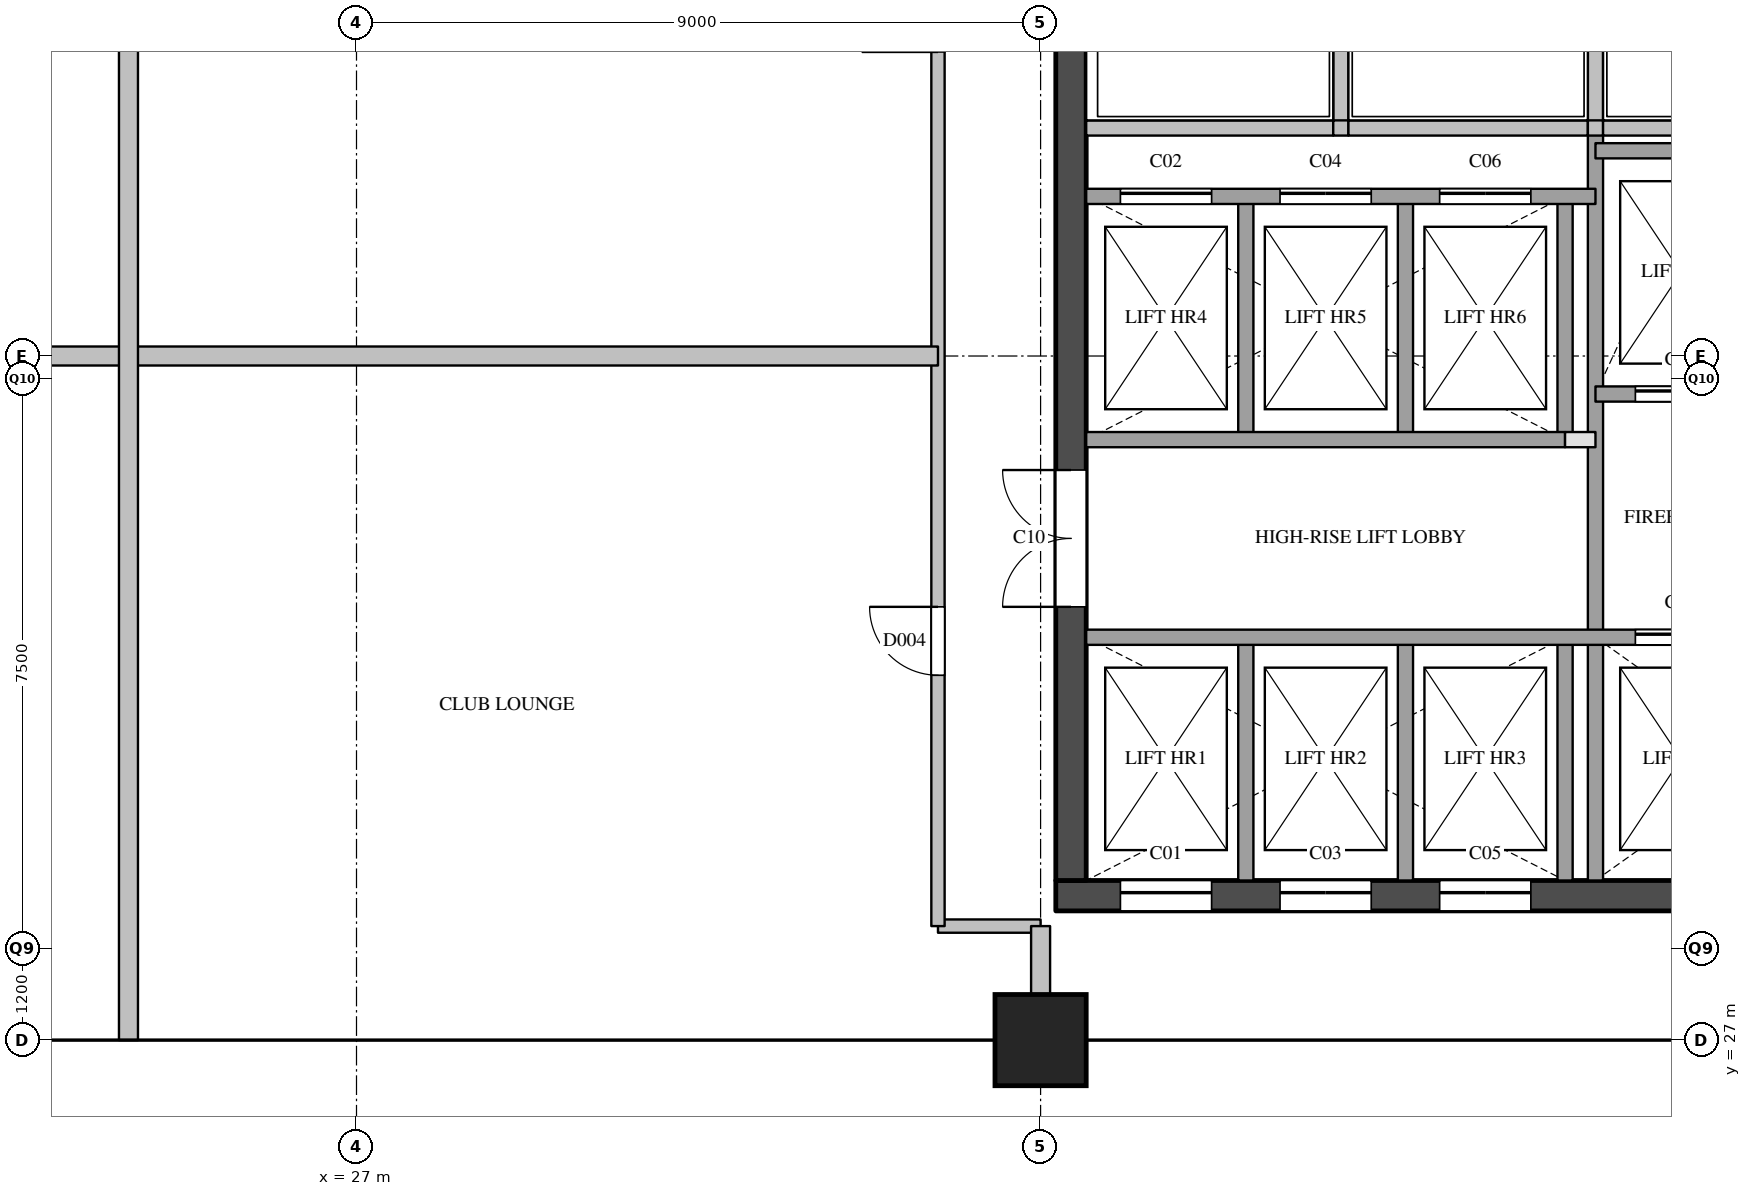
"""IFC4 building model, lengths in metres.
Left out: names, types, materials, properties, quantities, classifications, styles, units other than length and angle.
Written with IfcOpenShell. Run it as: python <this file> out.ifc"""

import sys

from ifc_helpers import new_model, si_unit, direction, frame, frame_2d, origin, origin_2d, place, context, subcontext, project, spatial, rectangle, extrude, element, fill, save


model = new_model("IFC4")
c1 = context("Model", 3, precision=1e-05, world=origin(), true_north=direction((0.0, 1.0)))
c2 = subcontext(c1, "Body", "Model", "MODEL_VIEW")
j1 = project(units=[si_unit("LENGTHUNIT", "METRE"), si_unit("PLANEANGLEUNIT", "RADIAN")], contexts=[c1])
p1 = place(None, origin())
s1 = spatial("IfcSite", under=j1, at=p1, CompositionType="ELEMENT")
p2 = place(p1, origin())
s2 = spatial("IfcBuilding", under=s1, at=p2, CompositionType="ELEMENT")
p3 = place(p2, frame((0.0, 0.0, 226.7)))
s3 = spatial("IfcBuildingStorey", under=s2, at=p3, CompositionType="ELEMENT", Elevation=226.7)
p4 = place(p3, frame((36.0, 27.0, 0.0), z_axis=(0.0, 0.0, 1.0), x_axis=(1.0, 0.0, 0.0)))
e1 = element("IfcColumn", 1, at=p4, inside=s3, PredefinedType="COLUMN", context=c2, shape_type="SweptSolid", body=[
    extrude(rectangle(XDim=1.2, YDim=1.2, at=origin_2d()), origin(), (0.0, 0.0, 1.0), 3.9),
])
p5 = place(p3, frame((36.2, 28.9, 0.0), z_axis=(0.0, 0.0, 1.0), x_axis=(1.0, 0.0, 0.0)))
e2 = element("IfcWall", 2, at=p5, inside=s3, PredefinedType="SHEAR", context=c2, shape_type="SweptSolid", body=[
    extrude(rectangle(XDim=12.0, YDim=0.4, at=frame_2d((6.0, 0.0))), origin(), (0.0, 0.0, 1.0), 3.5),
])
p6 = place(p5, frame((0.85, 0.0, 0.0)))
e3 = element("IfcOpeningElement", 3, at=p6, cuts=e2, PredefinedType="OPENING", context=c2, shape_type="SweptSolid", body=[
    extrude(rectangle(XDim=1.2, YDim=2.1, at=frame_2d((0.6, 1.05))), frame((0.0, 0.21, 0.0), z_axis=(0.0, -1.0, 0.0), x_axis=(1.0, 0.0, 0.0)), (0.0, 0.0, 1.0), 0.42),
])
p7 = place(p5, frame((2.95, 0.0, 0.0)))
e4 = element("IfcOpeningElement", 4, at=p7, cuts=e2, PredefinedType="OPENING", context=c2, shape_type="SweptSolid", body=[
    extrude(rectangle(XDim=1.2, YDim=2.1, at=frame_2d((0.6, 1.05))), frame((0.0, 0.21, 0.0), z_axis=(0.0, -1.0, 0.0), x_axis=(1.0, 0.0, 0.0)), (0.0, 0.0, 1.0), 0.42),
])
p8 = place(p5, frame((5.05, 0.0, 0.0)))
e5 = element("IfcOpeningElement", 5, at=p8, cuts=e2, PredefinedType="OPENING", context=c2, shape_type="SweptSolid", body=[
    extrude(rectangle(XDim=1.2, YDim=2.1, at=frame_2d((0.6, 1.05))), frame((0.0, 0.21, 0.0), z_axis=(0.0, -1.0, 0.0), x_axis=(1.0, 0.0, 0.0)), (0.0, 0.0, 1.0), 0.42),
])
p9 = place(p3, frame((36.4, 29.1, 0.0), z_axis=(0.0, 0.0, 1.0), x_axis=(0.0, 1.0, 0.0)))
e6 = element("IfcWall", 6, at=p9, inside=s3, PredefinedType="SHEAR", context=c2, shape_type="SweptSolid", body=[
    extrude(rectangle(XDim=20.3, YDim=0.4, at=frame_2d((10.15, 0.0))), origin(), (0.0, 0.0, 1.0), 3.5),
])
p10 = place(p9, frame((3.6, 0.0, 0.0)))
e7 = element("IfcOpeningElement", 7, at=p10, cuts=e6, PredefinedType="OPENING", context=c2, shape_type="SweptSolid", body=[
    extrude(rectangle(XDim=1.8, YDim=2.1, at=frame_2d((0.9, 1.05))), frame((0.0, 0.21, 0.0), z_axis=(0.0, -1.0, 0.0), x_axis=(1.0, 0.0, 0.0)), (0.0, 0.0, 1.0), 0.42),
])
p11 = place(p3, frame((38.7, 29.1, 0.0), z_axis=(0.0, 0.0, 1.0), x_axis=(0.0, 1.0, 0.0)))
e8 = element("IfcWall", 8, at=p11, inside=s3, PredefinedType="SOLIDWALL", context=c2, shape_type="SweptSolid", body=[
    extrude(rectangle(XDim=3.2, YDim=0.2, at=frame_2d((1.6, 0.0))), origin(), (0.0, 0.0, 1.0), 3.5),
])
p12 = place(p3, frame((38.7, 34.9, 0.0), z_axis=(0.0, 0.0, 1.0), x_axis=(0.0, 1.0, 0.0)))
e9 = element("IfcWall", 9, at=p12, inside=s3, PredefinedType="SOLIDWALL", context=c2, shape_type="SweptSolid", body=[
    extrude(rectangle(XDim=3.2, YDim=0.2, at=frame_2d((1.6, 0.0))), origin(), (0.0, 0.0, 1.0), 3.5),
])
p13 = place(p3, frame((39.95, 39.0, 0.0), z_axis=(0.0, 0.0, 1.0), x_axis=(0.0, 1.0, 0.0)))
e10 = element("IfcWall", 10, at=p13, inside=s3, PredefinedType="SOLIDWALL", context=c2, shape_type="SweptSolid", body=[
    extrude(rectangle(XDim=1.78, YDim=0.2, at=frame_2d((0.89, 0.0))), origin(), (0.0, 0.0, 1.0), 3.5),
])
p14 = place(p3, frame((40.8, 29.1, 0.0), z_axis=(0.0, 0.0, 1.0), x_axis=(0.0, 1.0, 0.0)))
e11 = element("IfcWall", 11, at=p14, inside=s3, PredefinedType="SOLIDWALL", context=c2, shape_type="SweptSolid", body=[
    extrude(rectangle(XDim=3.2, YDim=0.2, at=frame_2d((1.6, 0.0))), origin(), (0.0, 0.0, 1.0), 3.5),
])
p15 = place(p3, frame((40.8, 34.9, 0.0), z_axis=(0.0, 0.0, 1.0), x_axis=(0.0, 1.0, 0.0)))
e12 = element("IfcWall", 12, at=p15, inside=s3, PredefinedType="SOLIDWALL", context=c2, shape_type="SweptSolid", body=[
    extrude(rectangle(XDim=3.2, YDim=0.2, at=frame_2d((1.6, 0.0))), origin(), (0.0, 0.0, 1.0), 3.5),
])
p16 = place(p3, frame((42.9, 29.1, 0.0), z_axis=(0.0, 0.0, 1.0), x_axis=(0.0, 1.0, 0.0)))
e13 = element("IfcWall", 13, at=p16, inside=s3, PredefinedType="SOLIDWALL", context=c2, shape_type="SweptSolid", body=[
    extrude(rectangle(XDim=3.2, YDim=0.2, at=frame_2d((1.6, 0.0))), origin(), (0.0, 0.0, 1.0), 3.5),
])
p17 = place(p3, frame((42.9, 34.9, 0.0), z_axis=(0.0, 0.0, 1.0), x_axis=(0.0, 1.0, 0.0)))
e14 = element("IfcWall", 14, at=p17, inside=s3, PredefinedType="SOLIDWALL", context=c2, shape_type="SweptSolid", body=[
    extrude(rectangle(XDim=3.2, YDim=0.2, at=frame_2d((1.6, 0.0))), origin(), (0.0, 0.0, 1.0), 3.5),
])
p18 = place(p3, frame((43.3, 29.1, 0.0), z_axis=(0.0, 0.0, 1.0), x_axis=(0.0, 1.0, 0.0)))
e15 = element("IfcWall", 15, at=p18, inside=s3, PredefinedType="SOLIDWALL", context=c2, shape_type="SweptSolid", body=[
    extrude(rectangle(XDim=9.9, YDim=0.2, at=frame_2d((4.95, 0.0))), origin(), (0.0, 0.0, 1.0), 3.5),
])
p19 = place(p3, frame((43.3, 39.0, 0.0), z_axis=(0.0, 0.0, 1.0), x_axis=(0.0, 1.0, 0.0)))
e16 = element("IfcWall", 16, at=p19, inside=s3, PredefinedType="SOLIDWALL", context=c2, shape_type="SweptSolid", body=[
    extrude(rectangle(XDim=1.78, YDim=0.2, at=frame_2d((0.89, 0.0))), origin(), (0.0, 0.0, 1.0), 3.5),
])
p20 = place(p3, frame((36.6, 32.3, 0.0), z_axis=(0.0, 0.0, 1.0), x_axis=(1.0, 0.0, 0.0)))
e17 = element("IfcWall", 17, at=p20, inside=s3, PredefinedType="SOLIDWALL", context=c2, shape_type="SweptSolid", body=[
    extrude(rectangle(XDim=11.2, YDim=0.2, at=frame_2d((5.6, 0.0))), origin(), (0.0, 0.0, 1.0), 3.5),
])
p21 = place(p20, frame((7.225, 0.0, 0.0)))
e18 = element("IfcOpeningElement", 18, at=p21, cuts=e17, PredefinedType="OPENING", context=c2, shape_type="SweptSolid", body=[
    extrude(rectangle(XDim=1.2, YDim=2.1, at=frame_2d((0.6, 1.05))), frame((0.0, 0.11, 0.0), z_axis=(0.0, -1.0, 0.0), x_axis=(1.0, 0.0, 0.0)), (0.0, 0.0, 1.0), 0.22),
])
p22 = place(p20, frame((9.475, 0.0, 0.0)))
e19 = element("IfcOpeningElement", 19, at=p22, cuts=e17, PredefinedType="OPENING", context=c2, shape_type="SweptSolid", body=[
    extrude(rectangle(XDim=1.2, YDim=2.1, at=frame_2d((0.6, 1.05))), frame((0.0, 0.11, 0.0), z_axis=(0.0, -1.0, 0.0), x_axis=(1.0, 0.0, 0.0)), (0.0, 0.0, 1.0), 0.22),
])
p23 = place(p3, frame((42.9, 34.9, 0.0), z_axis=(0.0, 0.0, 1.0), x_axis=(1.0, 0.0, 0.0)))
e20 = element("IfcWall", 20, at=p23, inside=s3, PredefinedType="PARTITIONING", context=c2, shape_type="SweptSolid", body=[
    extrude(rectangle(XDim=0.4, YDim=0.2, at=frame_2d((0.2, 0.0))), origin(), (0.0, 0.0, 1.0), 3.5),
])
p24 = place(p3, frame((36.6, 34.9, 0.0), z_axis=(0.0, 0.0, 1.0), x_axis=(1.0, 0.0, 0.0)))
e21 = element("IfcWall", 21, at=p24, inside=s3, PredefinedType="SOLIDWALL", context=c2, shape_type="SweptSolid", body=[
    extrude(rectangle(XDim=6.3, YDim=0.2, at=frame_2d((3.15, 0.0))), origin(), (0.0, 0.0, 1.0), 3.5),
])
p25 = place(p3, frame((43.3, 35.5, 0.0), z_axis=(0.0, 0.0, 1.0), x_axis=(1.0, 0.0, 0.0)))
e22 = element("IfcWall", 22, at=p25, inside=s3, PredefinedType="SOLIDWALL", context=c2, shape_type="SweptSolid", body=[
    extrude(rectangle(XDim=4.5, YDim=0.2, at=frame_2d((2.25, 0.0))), origin(), (0.0, 0.0, 1.0), 3.5),
])
p26 = place(p25, frame((0.525, 0.0, 0.0)))
e23 = element("IfcOpeningElement", 23, at=p26, cuts=e22, PredefinedType="OPENING", context=c2, shape_type="SweptSolid", body=[
    extrude(rectangle(XDim=1.2, YDim=2.1, at=frame_2d((0.6, 1.05))), frame((0.0, 0.11, 0.0), z_axis=(0.0, -1.0, 0.0), x_axis=(1.0, 0.0, 0.0)), (0.0, 0.0, 1.0), 0.22),
])
p27 = place(p25, frame((3.025, 0.0, 0.0)))
e24 = element("IfcOpeningElement", 24, at=p27, cuts=e22, PredefinedType="OPENING", context=c2, shape_type="SweptSolid", body=[
    extrude(rectangle(XDim=0.7, YDim=2.1, at=frame_2d((0.35, 1.05))), frame((0.0, 0.11, 0.0), z_axis=(0.0, -1.0, 0.0), x_axis=(1.0, 0.0, 0.0)), (0.0, 0.0, 1.0), 0.22),
])
p28 = place(p3, frame((36.6, 38.1, 0.0), z_axis=(0.0, 0.0, 1.0), x_axis=(1.0, 0.0, 0.0)))
e25 = element("IfcWall", 25, at=p28, inside=s3, PredefinedType="SOLIDWALL", context=c2, shape_type="SweptSolid", body=[
    extrude(rectangle(XDim=6.7, YDim=0.2, at=frame_2d((3.35, 0.0))), origin(), (0.0, 0.0, 1.0), 3.5),
])
p29 = place(p28, frame((0.45, 0.0, 0.0)))
e26 = element("IfcOpeningElement", 26, at=p29, cuts=e25, PredefinedType="OPENING", context=c2, shape_type="SweptSolid", body=[
    extrude(rectangle(XDim=1.2, YDim=2.1, at=frame_2d((0.6, 1.05))), frame((0.0, 0.11, 0.0), z_axis=(0.0, -1.0, 0.0), x_axis=(1.0, 0.0, 0.0)), (0.0, 0.0, 1.0), 0.22),
])
p30 = place(p28, frame((2.55, 0.0, 0.0)))
e27 = element("IfcOpeningElement", 27, at=p30, cuts=e25, PredefinedType="OPENING", context=c2, shape_type="SweptSolid", body=[
    extrude(rectangle(XDim=1.2, YDim=2.1, at=frame_2d((0.6, 1.05))), frame((0.0, 0.11, 0.0), z_axis=(0.0, -1.0, 0.0), x_axis=(1.0, 0.0, 0.0)), (0.0, 0.0, 1.0), 0.22),
])
p31 = place(p28, frame((4.65, 0.0, 0.0)))
e28 = element("IfcOpeningElement", 28, at=p31, cuts=e25, PredefinedType="OPENING", context=c2, shape_type="SweptSolid", body=[
    extrude(rectangle(XDim=1.2, YDim=2.1, at=frame_2d((0.6, 1.05))), frame((0.0, 0.11, 0.0), z_axis=(0.0, -1.0, 0.0), x_axis=(1.0, 0.0, 0.0)), (0.0, 0.0, 1.0), 0.22),
])
p32 = place(p3, frame((43.3, 38.7, 0.0), z_axis=(0.0, 0.0, 1.0), x_axis=(1.0, 0.0, 0.0)))
e29 = element("IfcWall", 29, at=p32, inside=s3, PredefinedType="SOLIDWALL", context=c2, shape_type="SweptSolid", body=[
    extrude(rectangle(XDim=4.5, YDim=0.2, at=frame_2d((2.25, 0.0))), origin(), (0.0, 0.0, 1.0), 3.5),
])
p33 = place(p3, frame((36.6, 39.0, 0.0), z_axis=(0.0, 0.0, 1.0), x_axis=(1.0, 0.0, 0.0)))
e30 = element("IfcWall", 30, at=p33, inside=s3, PredefinedType="SOLIDWALL", context=c2, shape_type="SweptSolid", body=[
    extrude(rectangle(XDim=3.25, YDim=0.2, at=frame_2d((1.625, 0.0))), origin(), (0.0, 0.0, 1.0), 3.5),
])
p34 = place(p3, frame((39.85, 39.0, 0.0), z_axis=(0.0, 0.0, 1.0), x_axis=(1.0, 0.0, 0.0)))
e31 = element("IfcWall", 31, at=p34, inside=s3, PredefinedType="SOLIDWALL", context=c2, shape_type="SweptSolid", body=[
    extrude(rectangle(XDim=0.2, YDim=0.2, at=frame_2d((0.1, 0.0))), origin(), (0.0, 0.0, 1.0), 3.5),
])
p35 = place(p3, frame((40.05, 39.0, 0.0), z_axis=(0.0, 0.0, 1.0), x_axis=(1.0, 0.0, 0.0)))
e32 = element("IfcWall", 32, at=p35, inside=s3, PredefinedType="SOLIDWALL", context=c2, shape_type="SweptSolid", body=[
    extrude(rectangle(XDim=3.15, YDim=0.2, at=frame_2d((1.575, 0.0))), origin(), (0.0, 0.0, 1.0), 3.5),
])
p36 = place(p3, frame((43.2, 39.0, 0.0), z_axis=(0.0, 0.0, 1.0), x_axis=(1.0, 0.0, 0.0)))
e33 = element("IfcWall", 33, at=p36, inside=s3, PredefinedType="SOLIDWALL", context=c2, shape_type="SweptSolid", body=[
    extrude(rectangle(XDim=0.2, YDim=0.2, at=frame_2d((0.1, 0.0))), origin(), (0.0, 0.0, 1.0), 3.5),
])
p37 = place(p3, frame((43.4, 39.0, 0.0), z_axis=(0.0, 0.0, 1.0), x_axis=(1.0, 0.0, 0.0)))
e34 = element("IfcWall", 34, at=p37, inside=s3, PredefinedType="SOLIDWALL", context=c2, shape_type="SweptSolid", body=[
    extrude(rectangle(XDim=3.25, YDim=0.2, at=frame_2d((1.625, 0.0))), origin(), (0.0, 0.0, 1.0), 3.5),
])
p38 = place(p3, frame((34.65, 28.5, 0.0), z_axis=(0.0, 0.0, 1.0), x_axis=(1.0, 0.0, 0.0)))
e35 = element("IfcWall", 35, at=p38, inside=s3, PredefinedType="PARTITIONING", context=c2, shape_type="SweptSolid", body=[
    extrude(rectangle(XDim=1.35, YDim=0.175, at=frame_2d((0.675, 0.0))), origin(), (0.0, 0.0, 1.0), 3.5),
])
p39 = place(p3, frame((34.65, 28.5, 0.0), z_axis=(0.0, 0.0, 1.0), x_axis=(0.0, 1.0, 0.0)))
e36 = element("IfcWall", 36, at=p39, inside=s3, PredefinedType="PARTITIONING", context=c2, shape_type="SweptSolid", body=[
    extrude(rectangle(XDim=22.85, YDim=0.175, at=frame_2d((11.425, 0.0))), origin(), (0.0, 0.0, 1.0), 3.5),
])
p40 = place(p39, frame((3.3, 0.0, 0.0)))
e37 = element("IfcOpeningElement", 37, at=p40, cuts=e36, PredefinedType="OPENING", context=c2, shape_type="SweptSolid", body=[
    extrude(rectangle(XDim=0.9, YDim=2.1, at=frame_2d((0.45, 1.05))), frame((0.0, 0.097, 0.0), z_axis=(0.0, -1.0, 0.0), x_axis=(1.0, 0.0, 0.0)), (0.0, 0.0, 1.0), 0.195),
])
p41 = place(p39, frame((11.5, 0.0, 0.0)))
e38 = element("IfcOpeningElement", 38, at=p41, cuts=e36, PredefinedType="OPENING", context=c2, shape_type="SweptSolid", body=[
    extrude(rectangle(XDim=1.0, YDim=2.1, at=frame_2d((0.5, 1.05))), frame((0.0, 0.097, 0.0), z_axis=(0.0, -1.0, 0.0), x_axis=(1.0, 0.0, 0.0)), (0.0, 0.0, 1.0), 0.195),
])
p42 = place(p39, frame((19.225, 0.0, 0.0)))
e39 = element("IfcOpeningElement", 39, at=p42, cuts=e36, PredefinedType="OPENING", context=c2, shape_type="SweptSolid", body=[
    extrude(rectangle(XDim=0.9, YDim=2.1, at=frame_2d((0.45, 1.05))), frame((0.0, 0.097, 0.0), z_axis=(0.0, -1.0, 0.0), x_axis=(1.0, 0.0, 0.0)), (0.0, 0.0, 1.0), 0.195),
])
p43 = place(p3, frame((19.35, 36.0, 0.0), z_axis=(0.0, 0.0, 1.0), x_axis=(1.0, 0.0, 0.0)))
e40 = element("IfcWall", 40, at=p43, inside=s3, PredefinedType="PARTITIONING", context=c2, shape_type="SweptSolid", body=[
    extrude(rectangle(XDim=15.3, YDim=0.25, at=frame_2d((7.65, 0.0))), origin(), (0.0, 0.0, 1.0), 3.5),
])
p44 = place(p3, frame((24.0, 27.0, 0.0), z_axis=(0.0, 0.0, 1.0), x_axis=(0.0, 1.0, 0.0)))
e41 = element("IfcWall", 41, at=p44, inside=s3, PredefinedType="PARTITIONING", context=c2, shape_type="SweptSolid", body=[
    extrude(rectangle(XDim=27.0, YDim=0.25, at=frame_2d((13.5, 0.0))), origin(), (0.0, 0.0, 1.0), 3.5),
])
p45 = place(p3, frame((36.0, 27.0, 0.0), z_axis=(0.0, 0.0, 1.0), x_axis=(0.0, 1.0, 0.0)))
e42 = element("IfcWall", 42, at=p45, inside=s3, PredefinedType="PARTITIONING", context=c2, shape_type="SweptSolid", body=[
    extrude(rectangle(XDim=1.5, YDim=0.25, at=frame_2d((0.75, 0.0))), origin(), (0.0, 0.0, 1.0), 3.5),
])
p46 = place(p6, origin())
e43 = element("IfcDoor", 43, at=p46, inside=s3, OperationType="SLIDING_TO_LEFT", PredefinedType="DOOR", context=c2, shape_type="SweptSolid", body=[
    extrude(rectangle(XDim=1.2, YDim=2.1, at=frame_2d((0.6, 1.05))), frame((0.0, 0.025, 0.0), z_axis=(0.0, -1.0, 0.0), x_axis=(1.0, 0.0, 0.0)), (0.0, 0.0, 1.0), 0.05),
])
fill(e3, e43)
p47 = place(p29, origin())
e44 = element("IfcDoor", 44, at=p47, inside=s3, OperationType="SLIDING_TO_LEFT", PredefinedType="DOOR", context=c2, shape_type="SweptSolid", body=[
    extrude(rectangle(XDim=1.2, YDim=2.1, at=frame_2d((0.6, 1.05))), frame((0.0, 0.025, 0.0), z_axis=(0.0, -1.0, 0.0), x_axis=(1.0, 0.0, 0.0)), (0.0, 0.0, 1.0), 0.05),
])
fill(e26, e44)
p48 = place(p7, origin())
e45 = element("IfcDoor", 45, at=p48, inside=s3, OperationType="SLIDING_TO_LEFT", PredefinedType="DOOR", context=c2, shape_type="SweptSolid", body=[
    extrude(rectangle(XDim=1.2, YDim=2.1, at=frame_2d((0.6, 1.05))), frame((0.0, 0.025, 0.0), z_axis=(0.0, -1.0, 0.0), x_axis=(1.0, 0.0, 0.0)), (0.0, 0.0, 1.0), 0.05),
])
fill(e4, e45)
p49 = place(p30, origin())
e46 = element("IfcDoor", 46, at=p49, inside=s3, OperationType="SLIDING_TO_LEFT", PredefinedType="DOOR", context=c2, shape_type="SweptSolid", body=[
    extrude(rectangle(XDim=1.2, YDim=2.1, at=frame_2d((0.6, 1.05))), frame((0.0, 0.025, 0.0), z_axis=(0.0, -1.0, 0.0), x_axis=(1.0, 0.0, 0.0)), (0.0, 0.0, 1.0), 0.05),
])
fill(e27, e46)
p50 = place(p8, origin())
e47 = element("IfcDoor", 47, at=p50, inside=s3, OperationType="SLIDING_TO_LEFT", PredefinedType="DOOR", context=c2, shape_type="SweptSolid", body=[
    extrude(rectangle(XDim=1.2, YDim=2.1, at=frame_2d((0.6, 1.05))), frame((0.0, 0.025, 0.0), z_axis=(0.0, -1.0, 0.0), x_axis=(1.0, 0.0, 0.0)), (0.0, 0.0, 1.0), 0.05),
])
fill(e5, e47)
p51 = place(p31, origin())
e48 = element("IfcDoor", 48, at=p51, inside=s3, OperationType="SLIDING_TO_LEFT", PredefinedType="DOOR", context=c2, shape_type="SweptSolid", body=[
    extrude(rectangle(XDim=1.2, YDim=2.1, at=frame_2d((0.6, 1.05))), frame((0.0, 0.025, 0.0), z_axis=(0.0, -1.0, 0.0), x_axis=(1.0, 0.0, 0.0)), (0.0, 0.0, 1.0), 0.05),
])
fill(e28, e48)
p52 = place(p21, origin())
e49 = element("IfcDoor", 49, at=p52, inside=s3, OperationType="SLIDING_TO_LEFT", PredefinedType="DOOR", context=c2, shape_type="SweptSolid", body=[
    extrude(rectangle(XDim=1.2, YDim=2.1, at=frame_2d((0.6, 1.05))), frame((0.0, 0.025, 0.0), z_axis=(0.0, -1.0, 0.0), x_axis=(1.0, 0.0, 0.0)), (0.0, 0.0, 1.0), 0.05),
])
fill(e18, e49)
p53 = place(p26, origin())
e50 = element("IfcDoor", 50, at=p53, inside=s3, OperationType="SLIDING_TO_LEFT", PredefinedType="DOOR", context=c2, shape_type="SweptSolid", body=[
    extrude(rectangle(XDim=1.2, YDim=2.1, at=frame_2d((0.6, 1.05))), frame((0.0, 0.025, 0.0), z_axis=(0.0, -1.0, 0.0), x_axis=(1.0, 0.0, 0.0)), (0.0, 0.0, 1.0), 0.05),
])
fill(e23, e50)
p54 = place(p10, origin())
e51 = element("IfcDoor", 51, at=p54, inside=s3, OperationType="DOUBLE_DOOR_SINGLE_SWING", PredefinedType="DOOR", context=c2, shape_type="SweptSolid", body=[
    extrude(rectangle(XDim=1.8, YDim=2.1, at=frame_2d((0.9, 1.05))), frame((0.0, 0.025, 0.0), z_axis=(0.0, -1.0, 0.0), x_axis=(1.0, 0.0, 0.0)), (0.0, 0.0, 1.0), 0.05),
])
fill(e7, e51)
p55 = place(p40, origin())
e52 = element("IfcDoor", 52, at=p55, inside=s3, OperationType="SINGLE_SWING_RIGHT", PredefinedType="DOOR", context=c2, shape_type="SweptSolid", body=[
    extrude(rectangle(XDim=0.9, YDim=2.1, at=frame_2d((0.45, 1.05))), frame((0.0, 0.025, 0.0), z_axis=(0.0, -1.0, 0.0), x_axis=(1.0, 0.0, 0.0)), (0.0, 0.0, 1.0), 0.05),
])
fill(e37, e52)
save(model, sys.argv[1])
